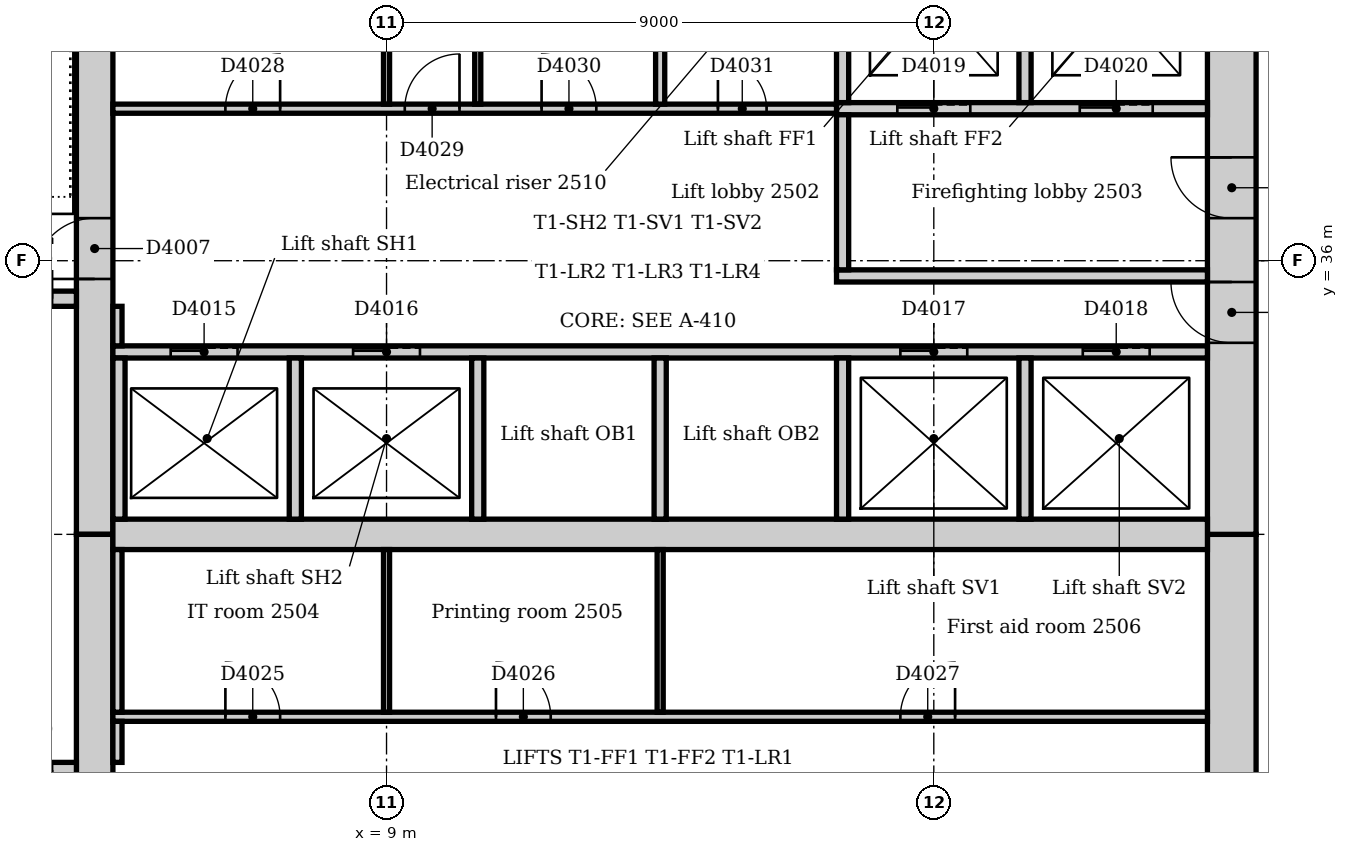
"""IFC4 building model, lengths in metres.
Left out: names, types, materials, properties, quantities, classifications, styles, units other than length and angle.
Written with IfcOpenShell. Run it as: python <this file> out.ifc"""

import sys

from ifc_helpers import new_model, si_unit, direction, frame, frame_2d, origin, place, context, subcontext, project, spatial, rectangle, extrude, element, fill, save


model = new_model("IFC4")
c1 = context("Model", 3, precision=1e-05, world=origin(), true_north=direction((0.0, 1.0)))
c2 = subcontext(c1, "Body", "Model", "MODEL_VIEW")
j1 = project(units=[si_unit("LENGTHUNIT", "METRE"), si_unit("PLANEANGLEUNIT", "RADIAN")], contexts=[c1])
p1 = place(None, origin())
s1 = spatial("IfcSite", under=j1, at=p1, CompositionType="ELEMENT")
p2 = place(p1, origin())
s2 = spatial("IfcBuilding", under=s1, at=p2, CompositionType="ELEMENT")
p3 = place(p2, frame((0.0, 0.0, 108.0)))
s3 = spatial("IfcBuildingStorey", under=s2, at=p3, CompositionType="ELEMENT", Elevation=108.0)
p4 = place(p3, frame((22.9, 21.0, 0.0), z_axis=(0.0, 0.0, 1.0), x_axis=(0.0, 1.0, 0.0)))
e1 = element("IfcWall", 1, at=p4, inside=s3, PredefinedType="SOLIDWALL", context=c2, shape_type="SweptSolid", body=[
    extrude(rectangle(XDim=10.5, YDim=0.8, at=frame_2d((5.25, 0.0))), origin(), (0.0, 0.0, 1.0), 4.0),
])
p5 = place(p4, frame((4.35, 0.0, 0.0)))
e2 = element("IfcOpeningElement", 2, at=p5, cuts=e1, PredefinedType="OPENING", context=c2, shape_type="SweptSolid", body=[
    extrude(rectangle(XDim=1.8, YDim=2.1, at=frame_2d((0.9, 1.05))), frame((0.0, 0.41, 0.0), z_axis=(0.0, -1.0, 0.0), x_axis=(1.0, 0.0, 0.0)), (0.0, 0.0, 1.0), 0.82),
])
p6 = place(p3, frame((22.9, 31.5, 0.0), z_axis=(0.0, 0.0, 1.0), x_axis=(0.0, 1.0, 0.0)))
e3 = element("IfcWall", 3, at=p6, inside=s3, PredefinedType="SOLIDWALL", context=c2, shape_type="SweptSolid", body=[
    extrude(rectangle(XDim=10.5, YDim=0.8, at=frame_2d((5.25, 0.0))), origin(), (0.0, 0.0, 1.0), 4.0),
])
p7 = place(p6, frame((3.15, 0.0, 0.0)))
e4 = element("IfcOpeningElement", 4, at=p7, cuts=e3, PredefinedType="OPENING", context=c2, shape_type="SweptSolid", body=[
    extrude(rectangle(XDim=1.0, YDim=2.1, at=frame_2d((0.5, 1.05))), frame((0.0, 0.41, 0.0), z_axis=(0.0, -1.0, 0.0), x_axis=(1.0, 0.0, 0.0)), (0.0, 0.0, 1.0), 0.82),
])
p8 = place(p6, frame((5.2, 0.0, 0.0)))
e5 = element("IfcOpeningElement", 5, at=p8, cuts=e3, PredefinedType="OPENING", context=c2, shape_type="SweptSolid", body=[
    extrude(rectangle(XDim=1.0, YDim=2.1, at=frame_2d((0.5, 1.05))), frame((0.0, 0.41, 0.0), z_axis=(0.0, -1.0, 0.0), x_axis=(1.0, 0.0, 0.0)), (0.0, 0.0, 1.0), 0.82),
])
p9 = place(p3, frame((4.2, 42.0, 0.0), z_axis=(0.0, 0.0, 1.0), x_axis=(0.0, -1.0, 0.0)))
e6 = element("IfcWall", 6, at=p9, inside=s3, PredefinedType="SOLIDWALL", context=c2, shape_type="SweptSolid", body=[
    extrude(rectangle(XDim=10.5, YDim=0.6, at=frame_2d((5.25, 0.0))), origin(), (0.0, 0.0, 1.0), 4.0),
])
p10 = place(p9, frame((5.3, 0.0, 0.0)))
e7 = element("IfcOpeningElement", 7, at=p10, cuts=e6, PredefinedType="OPENING", context=c2, shape_type="SweptSolid", body=[
    extrude(rectangle(XDim=1.0, YDim=2.1, at=frame_2d((0.5, 1.05))), frame((0.0, 0.31, 0.0), z_axis=(0.0, -1.0, 0.0), x_axis=(1.0, 0.0, 0.0)), (0.0, 0.0, 1.0), 0.62),
])
p11 = place(p3, frame((4.2, 31.5, 0.0), z_axis=(0.0, 0.0, 1.0), x_axis=(0.0, -1.0, 0.0)))
e8 = element("IfcWall", 8, at=p11, inside=s3, PredefinedType="SOLIDWALL", context=c2, shape_type="SweptSolid", body=[
    extrude(rectangle(XDim=10.5, YDim=0.6, at=frame_2d((5.25, 0.0))), origin(), (0.0, 0.0, 1.0), 4.0),
])
p12 = place(p11, frame((4.25, 0.0, 0.0)))
e9 = element("IfcOpeningElement", 9, at=p12, cuts=e8, PredefinedType="OPENING", context=c2, shape_type="SweptSolid", body=[
    extrude(rectangle(XDim=1.0, YDim=2.1, at=frame_2d((0.5, 1.05))), frame((0.0, 0.31, 0.0), z_axis=(0.0, -1.0, 0.0), x_axis=(1.0, 0.0, 0.0)), (0.0, 0.0, 1.0), 0.62),
])
p13 = place(p3, frame((4.5, 31.5, 0.0), z_axis=(0.0, 0.0, 1.0), x_axis=(1.0, 0.0, 0.0)))
e10 = element("IfcWall", 10, at=p13, inside=s3, PredefinedType="SOLIDWALL", context=c2, shape_type="SweptSolid", body=[
    extrude(rectangle(XDim=18.0, YDim=0.5, at=frame_2d((9.0, 0.0))), origin(), (0.0, 0.0, 1.0), 4.0),
])
p14 = place(p3, frame((3.9, 27.625, 0.0), z_axis=(0.0, 0.0, 1.0), x_axis=(-1.0, 0.0, 0.0)))
e11 = element("IfcWall", 11, at=p14, inside=s3, PredefinedType="SOLIDWALL", context=c2, shape_type="SweptSolid", body=[
    extrude(rectangle(XDim=3.54, YDim=0.25, at=frame_2d((1.77, 0.0))), origin(), (0.0, 0.0, 1.0), 4.0),
])
p15 = place(p14, frame((0.4, 0.0, 0.0)))
e12 = element("IfcOpeningElement", 12, at=p15, cuts=e11, PredefinedType="OPENING", context=c2, shape_type="SweptSolid", body=[
    extrude(rectangle(XDim=1.0, YDim=2.1, at=frame_2d((0.5, 1.05))), frame((0.0, 0.135, 0.0), z_axis=(0.0, -1.0, 0.0), x_axis=(1.0, 0.0, 0.0)), (0.0, 0.0, 1.0), 0.27),
])
p16 = place(p3, frame((0.36, 35.375, 0.0), z_axis=(0.0, 0.0, 1.0), x_axis=(1.0, 0.0, 0.0)))
e13 = element("IfcWall", 13, at=p16, inside=s3, PredefinedType="SOLIDWALL", context=c2, shape_type="SweptSolid", body=[
    extrude(rectangle(XDim=3.54, YDim=0.25, at=frame_2d((1.77, 0.0))), origin(), (0.0, 0.0, 1.0), 4.0),
])
p17 = place(p16, frame((2.14, 0.0, 0.0)))
e14 = element("IfcOpeningElement", 14, at=p17, cuts=e13, PredefinedType="OPENING", context=c2, shape_type="SweptSolid", body=[
    extrude(rectangle(XDim=1.0, YDim=2.1, at=frame_2d((0.5, 1.05))), frame((0.0, 0.135, 0.0), z_axis=(0.0, -1.0, 0.0), x_axis=(1.0, 0.0, 0.0)), (0.0, 0.0, 1.0), 0.27),
])
p18 = place(p3, frame((16.4, 35.75, 0.0), z_axis=(0.0, 0.0, 1.0), x_axis=(1.0, 0.0, 0.0)))
e15 = element("IfcWall", 15, at=p18, inside=s3, PredefinedType="PARTITIONING", context=c2, shape_type="SweptSolid", body=[
    extrude(rectangle(XDim=6.1, YDim=0.2, at=frame_2d((3.05, 0.0))), origin(), (0.0, 0.0, 1.0), 3.85),
])
p19 = place(p3, frame((16.4, 38.5, 0.0), z_axis=(0.0, 0.0, 1.0), x_axis=(1.0, 0.0, 0.0)))
e16 = element("IfcWall", 16, at=p19, inside=s3, PredefinedType="PARTITIONING", context=c2, shape_type="SweptSolid", body=[
    extrude(rectangle(XDim=6.1, YDim=0.2, at=frame_2d((3.05, 0.0))), origin(), (0.0, 0.0, 1.0), 3.85),
])
p20 = place(p19, frame((1.0, 0.0, 0.0)))
e17 = element("IfcOpeningElement", 17, at=p20, cuts=e16, PredefinedType="OPENING", context=c2, shape_type="SweptSolid", body=[
    extrude(rectangle(XDim=1.2, YDim=2.1, at=frame_2d((0.6, 1.05))), frame((0.0, 0.11, 0.0), z_axis=(0.0, -1.0, 0.0), x_axis=(1.0, 0.0, 0.0)), (0.0, 0.0, 1.0), 0.22),
])
p21 = place(p19, frame((4.0, 0.0, 0.0)))
e18 = element("IfcOpeningElement", 18, at=p21, cuts=e16, PredefinedType="OPENING", context=c2, shape_type="SweptSolid", body=[
    extrude(rectangle(XDim=1.2, YDim=2.1, at=frame_2d((0.6, 1.05))), frame((0.0, 0.11, 0.0), z_axis=(0.0, -1.0, 0.0), x_axis=(1.0, 0.0, 0.0)), (0.0, 0.0, 1.0), 0.22),
])
p22 = place(p3, frame((16.5, 35.85, 0.0), z_axis=(0.0, 0.0, 1.0), x_axis=(0.0, 1.0, 0.0)))
e19 = element("IfcWall", 19, at=p22, inside=s3, PredefinedType="PARTITIONING", context=c2, shape_type="SweptSolid", body=[
    extrude(rectangle(XDim=2.55, YDim=0.2, at=frame_2d((1.275, 0.0))), origin(), (0.0, 0.0, 1.0), 3.85),
])
p23 = place(p3, frame((4.5, 34.5, 0.0), z_axis=(0.0, 0.0, 1.0), x_axis=(1.0, 0.0, 0.0)))
e20 = element("IfcWall", 20, at=p23, inside=s3, PredefinedType="PARTITIONING", context=c2, shape_type="SweptSolid", body=[
    extrude(rectangle(XDim=18.0, YDim=0.2, at=frame_2d((9.0, 0.0))), origin(), (0.0, 0.0, 1.0), 3.85),
])
p24 = place(p23, frame((0.95, 0.0, 0.0)))
e21 = element("IfcOpeningElement", 21, at=p24, cuts=e20, PredefinedType="OPENING", context=c2, shape_type="SweptSolid", body=[
    extrude(rectangle(XDim=1.1, YDim=2.1, at=frame_2d((0.55, 1.05))), frame((0.0, 0.11, 0.0), z_axis=(0.0, -1.0, 0.0), x_axis=(1.0, 0.0, 0.0)), (0.0, 0.0, 1.0), 0.22),
])
p25 = place(p23, frame((3.95, 0.0, 0.0)))
e22 = element("IfcOpeningElement", 22, at=p25, cuts=e20, PredefinedType="OPENING", context=c2, shape_type="SweptSolid", body=[
    extrude(rectangle(XDim=1.1, YDim=2.1, at=frame_2d((0.55, 1.05))), frame((0.0, 0.11, 0.0), z_axis=(0.0, -1.0, 0.0), x_axis=(1.0, 0.0, 0.0)), (0.0, 0.0, 1.0), 0.22),
])
p26 = place(p23, frame((12.95, 0.0, 0.0)))
e23 = element("IfcOpeningElement", 23, at=p26, cuts=e20, PredefinedType="OPENING", context=c2, shape_type="SweptSolid", body=[
    extrude(rectangle(XDim=1.1, YDim=2.1, at=frame_2d((0.55, 1.05))), frame((0.0, 0.11, 0.0), z_axis=(0.0, -1.0, 0.0), x_axis=(1.0, 0.0, 0.0)), (0.0, 0.0, 1.0), 0.22),
])
p27 = place(p23, frame((15.95, 0.0, 0.0)))
e24 = element("IfcOpeningElement", 24, at=p27, cuts=e20, PredefinedType="OPENING", context=c2, shape_type="SweptSolid", body=[
    extrude(rectangle(XDim=1.1, YDim=2.1, at=frame_2d((0.55, 1.05))), frame((0.0, 0.11, 0.0), z_axis=(0.0, -1.0, 0.0), x_axis=(1.0, 0.0, 0.0)), (0.0, 0.0, 1.0), 0.22),
])
for number, where, z_axis, x_axis in (
    (25, (16.5, 38.6, 0.0), (0.0, 0.0, 1.0), (0.0, 1.0, 0.0)),
    (26, (19.5, 38.6, 0.0), (0.0, 0.0, 1.0), (0.0, 1.0, 0.0)),
):
    element("IfcWall", number, at=place(p3, frame(where, z_axis=z_axis, x_axis=x_axis)), inside=s3, PredefinedType="PARTITIONING", context=c2, shape_type="SweptSolid", body=[
        extrude(rectangle(XDim=3.4, YDim=0.2, at=frame_2d((1.7, 0.0))), origin(), (0.0, 0.0, 1.0), 3.85),
    ])
for number, where, z_axis, x_axis in (
    (27, (4.6, 31.75, 0.0), (0.0, 0.0, 1.0), (0.0, 1.0, 0.0)),
    (28, (7.5, 31.75, 0.0), (0.0, 0.0, 1.0), (0.0, 1.0, 0.0)),
    (29, (10.5, 31.75, 0.0), (0.0, 0.0, 1.0), (0.0, 1.0, 0.0)),
    (30, (13.5, 31.75, 0.0), (0.0, 0.0, 1.0), (0.0, 1.0, 0.0)),
    (31, (16.5, 31.75, 0.0), (0.0, 0.0, 1.0), (0.0, 1.0, 0.0)),
    (32, (19.5, 31.75, 0.0), (0.0, 0.0, 1.0), (0.0, 1.0, 0.0)),
):
    element("IfcWall", number, at=place(p3, frame(where, z_axis=z_axis, x_axis=x_axis)), inside=s3, PredefinedType="PARTITIONING", context=c2, shape_type="SweptSolid", body=[
        extrude(rectangle(XDim=2.65, YDim=0.2, at=frame_2d((1.325, 0.0))), origin(), (0.0, 0.0, 1.0), 3.85),
    ])
p28 = place(p3, frame((4.5, 28.5, 0.0), z_axis=(0.0, 0.0, 1.0), x_axis=(1.0, 0.0, 0.0)))
e33 = element("IfcWall", 33, at=p28, inside=s3, PredefinedType="PARTITIONING", context=c2, shape_type="SweptSolid", body=[
    extrude(rectangle(XDim=18.0, YDim=0.15, at=frame_2d((9.0, 0.0))), origin(), (0.0, 0.0, 1.0), 3.85),
])
p29 = place(p28, frame((1.85, 0.0, 0.0)))
e34 = element("IfcOpeningElement", 34, at=p29, cuts=e33, PredefinedType="OPENING", context=c2, shape_type="SweptSolid", body=[
    extrude(rectangle(XDim=0.9, YDim=2.1, at=frame_2d((0.45, 1.05))), frame((0.0, 0.085, 0.0), z_axis=(0.0, -1.0, 0.0), x_axis=(1.0, 0.0, 0.0)), (0.0, 0.0, 1.0), 0.17),
])
p30 = place(p28, frame((6.3, 0.0, 0.0)))
e35 = element("IfcOpeningElement", 35, at=p30, cuts=e33, PredefinedType="OPENING", context=c2, shape_type="SweptSolid", body=[
    extrude(rectangle(XDim=0.9, YDim=2.1, at=frame_2d((0.45, 1.05))), frame((0.0, 0.085, 0.0), z_axis=(0.0, -1.0, 0.0), x_axis=(1.0, 0.0, 0.0)), (0.0, 0.0, 1.0), 0.17),
])
p31 = place(p28, frame((12.95, 0.0, 0.0)))
e36 = element("IfcOpeningElement", 36, at=p31, cuts=e33, PredefinedType="OPENING", context=c2, shape_type="SweptSolid", body=[
    extrude(rectangle(XDim=0.9, YDim=2.1, at=frame_2d((0.45, 1.05))), frame((0.0, 0.085, 0.0), z_axis=(0.0, -1.0, 0.0), x_axis=(1.0, 0.0, 0.0)), (0.0, 0.0, 1.0), 0.17),
])
p32 = place(p3, frame((4.5, 38.5, 0.0), z_axis=(0.0, 0.0, 1.0), x_axis=(1.0, 0.0, 0.0)))
e37 = element("IfcWall", 37, at=p32, inside=s3, PredefinedType="PARTITIONING", context=c2, shape_type="SweptSolid", body=[
    extrude(rectangle(XDim=11.9, YDim=0.15, at=frame_2d((5.95, 0.0))), origin(), (0.0, 0.0, 1.0), 3.85),
])
p33 = place(p32, frame((1.85, 0.0, 0.0)))
e38 = element("IfcOpeningElement", 38, at=p33, cuts=e37, PredefinedType="OPENING", context=c2, shape_type="SweptSolid", body=[
    extrude(rectangle(XDim=0.9, YDim=2.1, at=frame_2d((0.45, 1.05))), frame((0.0, 0.085, 0.0), z_axis=(0.0, -1.0, 0.0), x_axis=(1.0, 0.0, 0.0)), (0.0, 0.0, 1.0), 0.17),
])
p34 = place(p32, frame((4.8, 0.0, 0.0)))
e39 = element("IfcOpeningElement", 39, at=p34, cuts=e37, PredefinedType="OPENING", context=c2, shape_type="SweptSolid", body=[
    extrude(rectangle(XDim=0.9, YDim=2.1, at=frame_2d((0.45, 1.05))), frame((0.0, 0.085, 0.0), z_axis=(0.0, -1.0, 0.0), x_axis=(1.0, 0.0, 0.0)), (0.0, 0.0, 1.0), 0.17),
])
p35 = place(p32, frame((7.05, 0.0, 0.0)))
e40 = element("IfcOpeningElement", 40, at=p35, cuts=e37, PredefinedType="OPENING", context=c2, shape_type="SweptSolid", body=[
    extrude(rectangle(XDim=0.9, YDim=2.1, at=frame_2d((0.45, 1.05))), frame((0.0, 0.085, 0.0), z_axis=(0.0, -1.0, 0.0), x_axis=(1.0, 0.0, 0.0)), (0.0, 0.0, 1.0), 0.17),
])
p36 = place(p32, frame((9.95, 0.0, 0.0)))
e41 = element("IfcOpeningElement", 41, at=p36, cuts=e37, PredefinedType="OPENING", context=c2, shape_type="SweptSolid", body=[
    extrude(rectangle(XDim=0.8, YDim=2.1, at=frame_2d((0.4, 1.05))), frame((0.0, 0.085, 0.0), z_axis=(0.0, -1.0, 0.0), x_axis=(1.0, 0.0, 0.0)), (0.0, 0.0, 1.0), 0.17),
])
p37 = place(p3, frame((4.575, 27.75, 0.0), z_axis=(0.0, 0.0, 1.0), x_axis=(0.0, 1.0, 0.0)))
e42 = element("IfcWall", 42, at=p37, inside=s3, PredefinedType="PARTITIONING", context=c2, shape_type="SweptSolid", body=[
    extrude(rectangle(XDim=0.675, YDim=0.15, at=frame_2d((0.338, 0.0))), origin(), (0.0, 0.0, 1.0), 3.85),
])
p38 = place(p3, frame((4.575, 28.575, 0.0), z_axis=(0.0, 0.0, 1.0), x_axis=(0.0, 1.0, 0.0)))
e43 = element("IfcWall", 43, at=p38, inside=s3, PredefinedType="PARTITIONING", context=c2, shape_type="SweptSolid", body=[
    extrude(rectangle(XDim=2.675, YDim=0.15, at=frame_2d((1.337, 0.0))), origin(), (0.0, 0.0, 1.0), 3.85),
])
p39 = place(p3, frame((4.575, 34.6, 0.0), z_axis=(0.0, 0.0, 1.0), x_axis=(0.0, 1.0, 0.0)))
e44 = element("IfcWall", 44, at=p39, inside=s3, PredefinedType="PARTITIONING", context=c2, shape_type="SweptSolid", body=[
    extrude(rectangle(XDim=0.65, YDim=0.15, at=frame_2d((0.325, 0.0))), origin(), (0.0, 0.0, 1.0), 3.85),
])
p40 = place(p3, frame((13.5, 38.575, 0.0), z_axis=(0.0, 0.0, 1.0), x_axis=(0.0, 1.0, 0.0)))
e45 = element("IfcWall", 45, at=p40, inside=s3, PredefinedType="PARTITIONING", context=c2, shape_type="SweptSolid", body=[
    extrude(rectangle(XDim=3.425, YDim=0.15, at=frame_2d((1.712, 0.0))), origin(), (0.0, 0.0, 1.0), 3.85),
])
for number, where, z_axis, x_axis in (
    (46, (9.0, 38.575, 0.0), (0.0, 0.0, 1.0), (0.0, 1.0, 0.0)),
    (47, (10.5, 38.575, 0.0), (0.0, 0.0, 1.0), (0.0, 1.0, 0.0)),
):
    element("IfcWall", number, at=place(p3, frame(where, z_axis=z_axis, x_axis=x_axis)), inside=s3, PredefinedType="PARTITIONING", context=c2, shape_type="SweptSolid", body=[
        extrude(rectangle(XDim=3.425, YDim=0.1, at=frame_2d((1.712, 0.0))), origin(), (0.0, 0.0, 1.0), 3.85),
    ])
for number, where, z_axis, x_axis in (
    (48, (9.0, 28.575, 0.0), (0.0, 0.0, 1.0), (0.0, 1.0, 0.0)),
    (49, (13.5, 28.575, 0.0), (0.0, 0.0, 1.0), (0.0, 1.0, 0.0)),
):
    element("IfcWall", number, at=place(p3, frame(where, z_axis=z_axis, x_axis=x_axis)), inside=s3, PredefinedType="PARTITIONING", context=c2, shape_type="SweptSolid", body=[
        extrude(rectangle(XDim=2.675, YDim=0.1, at=frame_2d((1.337, 0.0))), origin(), (0.0, 0.0, 1.0), 3.85),
    ])
p41 = place(p10, frame((1.0, 0.0, 0.0), z_axis=(0.0, 0.0, 1.0), x_axis=(-1.0, 0.0, 0.0)))
e50 = element("IfcDoor", 50, at=p41, inside=s3, OperationType="SINGLE_SWING_LEFT", PredefinedType="DOOR", context=c2, shape_type="SweptSolid", body=[
    extrude(rectangle(XDim=1.0, YDim=2.1, at=frame_2d((0.5, 1.05))), frame((0.0, 0.025, 0.0), z_axis=(0.0, -1.0, 0.0), x_axis=(1.0, 0.0, 0.0)), (0.0, 0.0, 1.0), 0.05),
])
fill(e7, e50)
p42 = place(p24, origin())
e51 = element("IfcDoor", 51, at=p42, inside=s3, OperationType="SLIDING_TO_LEFT", PredefinedType="DOOR", context=c2, shape_type="SweptSolid", body=[
    extrude(rectangle(XDim=1.1, YDim=2.1, at=frame_2d((0.55, 1.05))), frame((0.0, 0.025, 0.0), z_axis=(0.0, -1.0, 0.0), x_axis=(1.0, 0.0, 0.0)), (0.0, 0.0, 1.0), 0.05),
])
fill(e21, e51)
p43 = place(p25, origin())
e52 = element("IfcDoor", 52, at=p43, inside=s3, OperationType="SLIDING_TO_LEFT", PredefinedType="DOOR", context=c2, shape_type="SweptSolid", body=[
    extrude(rectangle(XDim=1.1, YDim=2.1, at=frame_2d((0.55, 1.05))), frame((0.0, 0.025, 0.0), z_axis=(0.0, -1.0, 0.0), x_axis=(1.0, 0.0, 0.0)), (0.0, 0.0, 1.0), 0.05),
])
fill(e22, e52)
p44 = place(p26, origin())
e53 = element("IfcDoor", 53, at=p44, inside=s3, OperationType="SLIDING_TO_LEFT", PredefinedType="DOOR", context=c2, shape_type="SweptSolid", body=[
    extrude(rectangle(XDim=1.1, YDim=2.1, at=frame_2d((0.55, 1.05))), frame((0.0, 0.025, 0.0), z_axis=(0.0, -1.0, 0.0), x_axis=(1.0, 0.0, 0.0)), (0.0, 0.0, 1.0), 0.05),
])
fill(e23, e53)
p45 = place(p27, origin())
e54 = element("IfcDoor", 54, at=p45, inside=s3, OperationType="SLIDING_TO_LEFT", PredefinedType="DOOR", context=c2, shape_type="SweptSolid", body=[
    extrude(rectangle(XDim=1.1, YDim=2.1, at=frame_2d((0.55, 1.05))), frame((0.0, 0.025, 0.0), z_axis=(0.0, -1.0, 0.0), x_axis=(1.0, 0.0, 0.0)), (0.0, 0.0, 1.0), 0.05),
])
fill(e24, e54)
p46 = place(p20, origin())
e55 = element("IfcDoor", 55, at=p46, inside=s3, OperationType="SLIDING_TO_LEFT", PredefinedType="DOOR", context=c2, shape_type="SweptSolid", body=[
    extrude(rectangle(XDim=1.2, YDim=2.1, at=frame_2d((0.6, 1.05))), frame((0.0, 0.025, 0.0), z_axis=(0.0, -1.0, 0.0), x_axis=(1.0, 0.0, 0.0)), (0.0, 0.0, 1.0), 0.05),
])
fill(e17, e55)
p47 = place(p21, origin())
e56 = element("IfcDoor", 56, at=p47, inside=s3, OperationType="SLIDING_TO_LEFT", PredefinedType="DOOR", context=c2, shape_type="SweptSolid", body=[
    extrude(rectangle(XDim=1.2, YDim=2.1, at=frame_2d((0.6, 1.05))), frame((0.0, 0.025, 0.0), z_axis=(0.0, -1.0, 0.0), x_axis=(1.0, 0.0, 0.0)), (0.0, 0.0, 1.0), 0.05),
])
fill(e18, e56)
p48 = place(p7, origin())
e57 = element("IfcDoor", 57, at=p48, inside=s3, OperationType="SINGLE_SWING_RIGHT", PredefinedType="DOOR", context=c2, shape_type="SweptSolid", body=[
    extrude(rectangle(XDim=1.0, YDim=2.1, at=frame_2d((0.5, 1.05))), frame((0.0, 0.025, 0.0), z_axis=(0.0, -1.0, 0.0), x_axis=(1.0, 0.0, 0.0)), (0.0, 0.0, 1.0), 0.05),
])
fill(e4, e57)
p49 = place(p8, origin())
e58 = element("IfcDoor", 58, at=p49, inside=s3, OperationType="SINGLE_SWING_RIGHT", PredefinedType="DOOR", context=c2, shape_type="SweptSolid", body=[
    extrude(rectangle(XDim=1.0, YDim=2.1, at=frame_2d((0.5, 1.05))), frame((0.0, 0.025, 0.0), z_axis=(0.0, -1.0, 0.0), x_axis=(1.0, 0.0, 0.0)), (0.0, 0.0, 1.0), 0.05),
])
fill(e5, e58)
p50 = place(p29, origin())
e59 = element("IfcDoor", 59, at=p50, inside=s3, OperationType="SINGLE_SWING_LEFT", PredefinedType="DOOR", context=c2, shape_type="SweptSolid", body=[
    extrude(rectangle(XDim=0.9, YDim=2.1, at=frame_2d((0.45, 1.05))), frame((0.0, 0.025, 0.0), z_axis=(0.0, -1.0, 0.0), x_axis=(1.0, 0.0, 0.0)), (0.0, 0.0, 1.0), 0.05),
])
fill(e34, e59)
p51 = place(p30, origin())
e60 = element("IfcDoor", 60, at=p51, inside=s3, OperationType="SINGLE_SWING_LEFT", PredefinedType="DOOR", context=c2, shape_type="SweptSolid", body=[
    extrude(rectangle(XDim=0.9, YDim=2.1, at=frame_2d((0.45, 1.05))), frame((0.0, 0.025, 0.0), z_axis=(0.0, -1.0, 0.0), x_axis=(1.0, 0.0, 0.0)), (0.0, 0.0, 1.0), 0.05),
])
fill(e35, e60)
p52 = place(p31, origin())
e61 = element("IfcDoor", 61, at=p52, inside=s3, OperationType="SINGLE_SWING_RIGHT", PredefinedType="DOOR", context=c2, shape_type="SweptSolid", body=[
    extrude(rectangle(XDim=0.9, YDim=2.1, at=frame_2d((0.45, 1.05))), frame((0.0, 0.025, 0.0), z_axis=(0.0, -1.0, 0.0), x_axis=(1.0, 0.0, 0.0)), (0.0, 0.0, 1.0), 0.05),
])
fill(e36, e61)
p53 = place(p33, origin())
e62 = element("IfcDoor", 62, at=p53, inside=s3, OperationType="SINGLE_SWING_RIGHT", PredefinedType="DOOR", context=c2, shape_type="SweptSolid", body=[
    extrude(rectangle(XDim=0.9, YDim=2.1, at=frame_2d((0.45, 1.05))), frame((0.0, 0.025, 0.0), z_axis=(0.0, -1.0, 0.0), x_axis=(1.0, 0.0, 0.0)), (0.0, 0.0, 1.0), 0.05),
])
fill(e38, e62)
p54 = place(p34, origin())
e63 = element("IfcDoor", 63, at=p54, inside=s3, OperationType="SINGLE_SWING_RIGHT", PredefinedType="DOOR", context=c2, shape_type="SweptSolid", body=[
    extrude(rectangle(XDim=0.9, YDim=2.1, at=frame_2d((0.45, 1.05))), frame((0.0, 0.025, 0.0), z_axis=(0.0, -1.0, 0.0), x_axis=(1.0, 0.0, 0.0)), (0.0, 0.0, 1.0), 0.05),
])
fill(e39, e63)
p55 = place(p35, origin())
e64 = element("IfcDoor", 64, at=p55, inside=s3, OperationType="SINGLE_SWING_LEFT", PredefinedType="DOOR", context=c2, shape_type="SweptSolid", body=[
    extrude(rectangle(XDim=0.9, YDim=2.1, at=frame_2d((0.45, 1.05))), frame((0.0, 0.025, 0.0), z_axis=(0.0, -1.0, 0.0), x_axis=(1.0, 0.0, 0.0)), (0.0, 0.0, 1.0), 0.05),
])
fill(e40, e64)
p56 = place(p36, origin())
e65 = element("IfcDoor", 65, at=p56, inside=s3, OperationType="SINGLE_SWING_LEFT", PredefinedType="DOOR", context=c2, shape_type="SweptSolid", body=[
    extrude(rectangle(XDim=0.8, YDim=2.1, at=frame_2d((0.4, 1.05))), frame((0.0, 0.025, 0.0), z_axis=(0.0, -1.0, 0.0), x_axis=(1.0, 0.0, 0.0)), (0.0, 0.0, 1.0), 0.05),
])
fill(e41, e65)
save(model, sys.argv[1])
